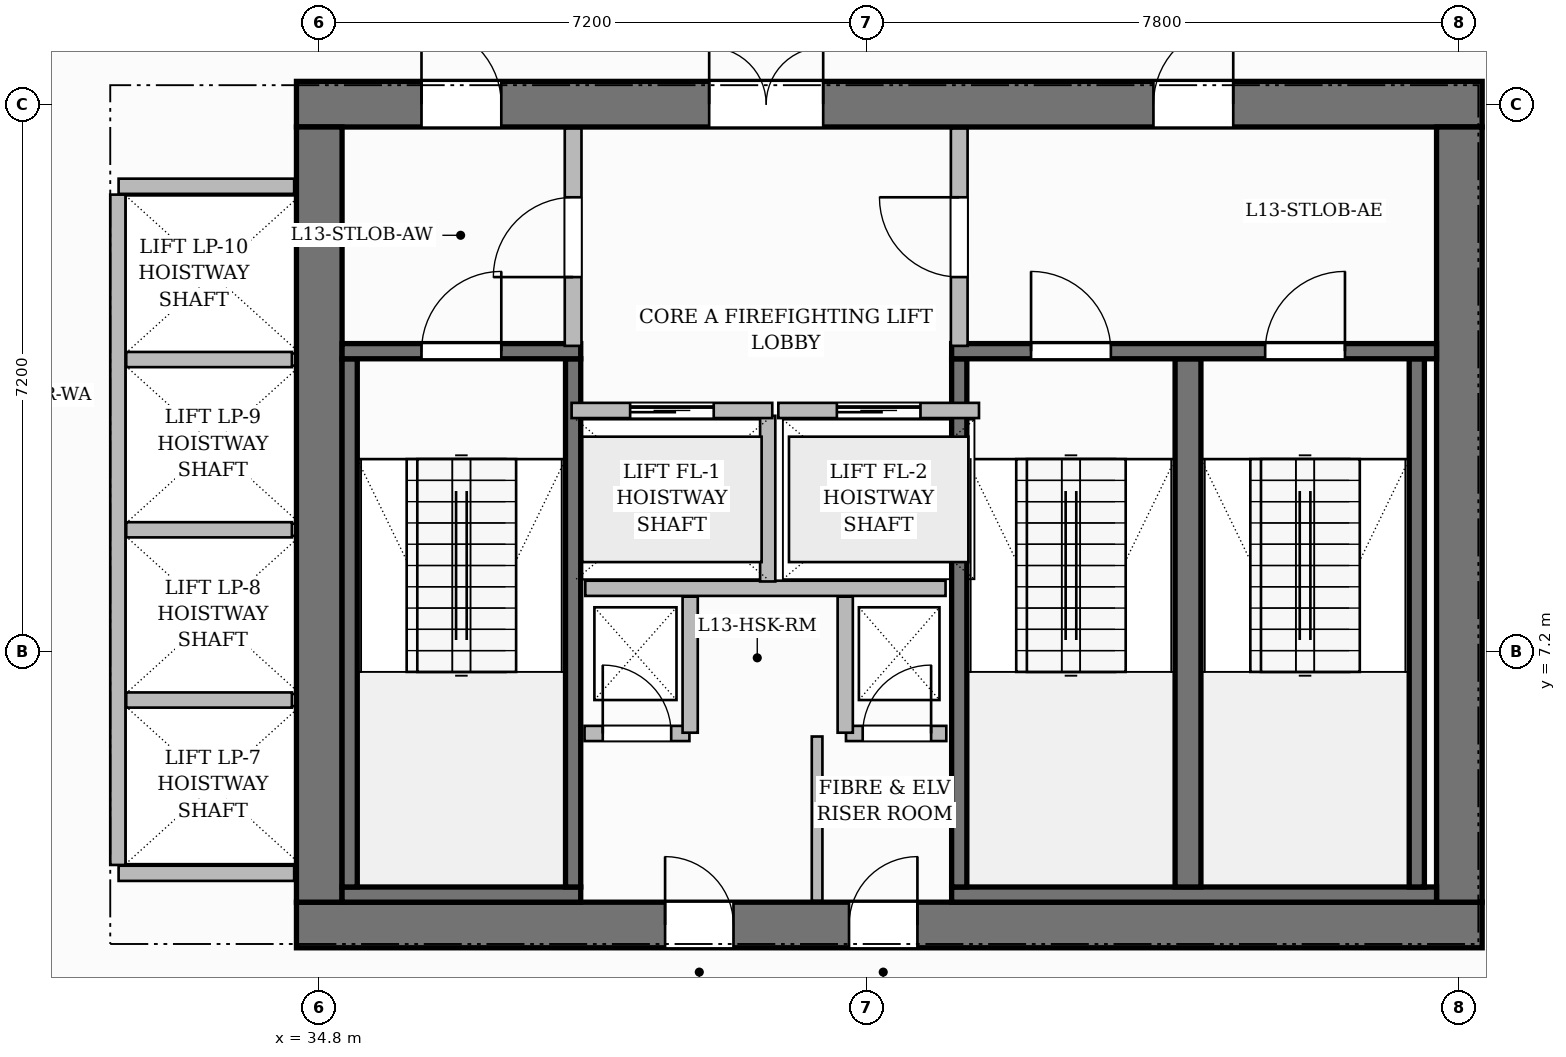
"""IFC4 building model, lengths in metres.
Left out: names, types, materials, properties, quantities, classifications, styles, units other than length and angle.
Written with IfcOpenShell. Run it as: python <this file> out.ifc"""

import sys

from ifc_helpers import new_model, si_unit, direction, frame, frame_2d, origin, place, context, subcontext, project, spatial, rectangle, extrude, source, transform, mapped, element, fill, save


model = new_model("IFC4")
c1 = context("Model", 3, precision=1e-05, world=origin(), true_north=direction((0.0, 1.0)))
c2 = subcontext(c1, "Body", "Model", "MODEL_VIEW")
j1 = project(units=[si_unit("LENGTHUNIT", "METRE"), si_unit("PLANEANGLEUNIT", "RADIAN")], contexts=[c1])
p1 = place(None, origin())
s1 = spatial("IfcSite", under=j1, at=p1, CompositionType="ELEMENT")
p2 = place(p1, origin())
s2 = spatial("IfcBuilding", under=s1, at=p2, CompositionType="ELEMENT")
p3 = place(p2, frame((0.0, 0.0, 58.3)))
s3 = spatial("IfcBuildingStorey", under=s2, at=p3, CompositionType="ELEMENT", Elevation=58.3)
p4 = place(p3, frame((34.5, 3.6, 0.0), z_axis=(0.0, 0.0, 1.0), x_axis=(1.0, 0.0, 0.0)))
e1 = element("IfcWall", 1, at=p4, inside=s3, PredefinedType="SHEAR", context=c2, shape_type="SweptSolid", body=[
    extrude(rectangle(XDim=15.6, YDim=0.6, at=frame_2d((7.8, 0.0))), origin(), (0.0, 0.0, 1.0), 3.7),
])
p5 = place(p4, frame((4.85, 0.0, 0.0)))
e2 = element("IfcOpeningElement", 2, at=p5, cuts=e1, PredefinedType="OPENING", context=c2, shape_type="SweptSolid", body=[
    extrude(rectangle(XDim=0.9, YDim=2.1, at=frame_2d((0.45, 1.05))), frame((0.0, 0.31, 0.0), z_axis=(0.0, -1.0, 0.0), x_axis=(1.0, 0.0, 0.0)), (0.0, 0.0, 1.0), 0.62),
])
p6 = place(p4, frame((7.27, 0.0, 0.0)))
e3 = element("IfcOpeningElement", 3, at=p6, cuts=e1, PredefinedType="OPENING", context=c2, shape_type="SweptSolid", body=[
    extrude(rectangle(XDim=0.9, YDim=2.1, at=frame_2d((0.45, 1.05))), frame((0.0, 0.31, 0.0), z_axis=(0.0, -1.0, 0.0), x_axis=(1.0, 0.0, 0.0)), (0.0, 0.0, 1.0), 0.62),
])
p7 = place(p3, frame((34.5, 14.4, 0.0), z_axis=(0.0, 0.0, 1.0), x_axis=(1.0, 0.0, 0.0)))
e4 = element("IfcWall", 4, at=p7, inside=s3, PredefinedType="SHEAR", context=c2, shape_type="SweptSolid", body=[
    extrude(rectangle(XDim=15.6, YDim=0.6, at=frame_2d((7.8, 0.0))), origin(), (0.0, 0.0, 1.0), 3.7),
])
p8 = place(p7, frame((5.43, 0.0, 0.0)))
e5 = element("IfcOpeningElement", 5, at=p8, cuts=e4, PredefinedType="OPENING", context=c2, shape_type="SweptSolid", body=[
    extrude(rectangle(XDim=1.5, YDim=2.2, at=frame_2d((0.75, 1.1))), frame((0.0, 0.31, 0.0), z_axis=(0.0, -1.0, 0.0), x_axis=(1.0, 0.0, 0.0)), (0.0, 0.0, 1.0), 0.62),
])
p9 = place(p7, frame((1.645, 0.0, 0.0)))
e6 = element("IfcOpeningElement", 6, at=p9, cuts=e4, PredefinedType="OPENING", context=c2, shape_type="SweptSolid", body=[
    extrude(rectangle(XDim=1.05, YDim=2.15, at=frame_2d((0.525, 1.075))), frame((0.0, 0.31, 0.0), z_axis=(0.0, -1.0, 0.0), x_axis=(1.0, 0.0, 0.0)), (0.0, 0.0, 1.0), 0.62),
])
p10 = place(p7, frame((11.275, 0.0, 0.0)))
e7 = element("IfcOpeningElement", 7, at=p10, cuts=e4, PredefinedType="OPENING", context=c2, shape_type="SweptSolid", body=[
    extrude(rectangle(XDim=1.05, YDim=2.15, at=frame_2d((0.525, 1.075))), frame((0.0, 0.31, 0.0), z_axis=(0.0, -1.0, 0.0), x_axis=(1.0, 0.0, 0.0)), (0.0, 0.0, 1.0), 0.62),
])
for number, where, z_axis, x_axis in (
    (8, (34.8, 3.9, 0.0), (0.0, 0.0, 1.0), (0.0, 1.0, 0.0)),
    (9, (49.8, 3.9, 0.0), (0.0, 0.0, 1.0), (0.0, 1.0, 0.0)),
):
    element("IfcWall", number, at=place(p3, frame(where, z_axis=z_axis, x_axis=x_axis)), inside=s3, PredefinedType="SHEAR", context=c2, shape_type="SweptSolid", body=[
        extrude(rectangle(XDim=10.2, YDim=0.6, at=frame_2d((5.1, 0.0))), origin(), (0.0, 0.0, 1.0), 3.7),
    ])
p11 = place(p3, frame((35.1, 4.0, 0.0), z_axis=(0.0, 0.0, 1.0), x_axis=(1.0, 0.0, 0.0)))
e10 = element("IfcWall", 10, at=p11, inside=s3, PredefinedType="SHEAR", context=c2, shape_type="SweptSolid", body=[
    extrude(rectangle(XDim=3.14, YDim=0.2, at=frame_2d((1.57, 0.0))), origin(), (0.0, 0.0, 1.0), 3.7),
])
for number, where, z_axis, x_axis in (
    (11, (35.2, 4.1, 0.0), (0.0, 0.0, 1.0), (0.0, 1.0, 0.0)),
    (12, (38.14, 4.1, 0.0), (0.0, 0.0, 1.0), (0.0, 1.0, 0.0)),
):
    element("IfcWall", number, at=place(p3, frame(where, z_axis=z_axis, x_axis=x_axis)), inside=s3, PredefinedType="SHEAR", context=c2, shape_type="SweptSolid", body=[
        extrude(rectangle(XDim=6.95, YDim=0.2, at=frame_2d((3.475, 0.0))), origin(), (0.0, 0.0, 1.0), 3.7),
    ])
p12 = place(p3, frame((35.1, 11.15, 0.0), z_axis=(0.0, 0.0, 1.0), x_axis=(1.0, 0.0, 0.0)))
e13 = element("IfcWall", 13, at=p12, inside=s3, PredefinedType="SHEAR", context=c2, shape_type="SweptSolid", body=[
    extrude(rectangle(XDim=3.14, YDim=0.2, at=frame_2d((1.57, 0.0))), origin(), (0.0, 0.0, 1.0), 3.7),
])
p13 = place(p12, frame((1.045, 0.0, 0.0)))
e14 = element("IfcOpeningElement", 14, at=p13, cuts=e13, PredefinedType="OPENING", context=c2, shape_type="SweptSolid", body=[
    extrude(rectangle(XDim=1.05, YDim=2.2, at=frame_2d((0.525, 1.1))), frame((0.0, 0.11, 0.0), z_axis=(0.0, -1.0, 0.0), x_axis=(1.0, 0.0, 0.0)), (0.0, 0.0, 1.0), 0.22),
])
p14 = place(p3, frame((43.12, 4.0, 0.0), z_axis=(0.0, 0.0, 1.0), x_axis=(1.0, 0.0, 0.0)))
e15 = element("IfcWall", 15, at=p14, inside=s3, PredefinedType="SHEAR", context=c2, shape_type="SweptSolid", body=[
    extrude(rectangle(XDim=6.38, YDim=0.2, at=frame_2d((3.19, 0.0))), origin(), (0.0, 0.0, 1.0), 3.7),
])
p15 = place(p3, frame((43.22, 4.1, 0.0), z_axis=(0.0, 0.0, 1.0), x_axis=(0.0, 1.0, 0.0)))
e16 = element("IfcWall", 16, at=p15, inside=s3, PredefinedType="SHEAR", context=c2, shape_type="SweptSolid", body=[
    extrude(rectangle(XDim=6.95, YDim=0.2, at=frame_2d((3.475, 0.0))), origin(), (0.0, 0.0, 1.0), 3.7),
])
p16 = place(p3, frame((46.23, 4.1, 0.0), z_axis=(0.0, 0.0, 1.0), x_axis=(0.0, 1.0, 0.0)))
e17 = element("IfcWall", 17, at=p16, inside=s3, PredefinedType="SHEAR", context=c2, shape_type="SweptSolid", body=[
    extrude(rectangle(XDim=6.95, YDim=0.34, at=frame_2d((3.475, 0.0))), origin(), (0.0, 0.0, 1.0), 3.7),
])
p17 = place(p3, frame((49.24, 4.1, 0.0), z_axis=(0.0, 0.0, 1.0), x_axis=(0.0, 1.0, 0.0)))
e18 = element("IfcWall", 18, at=p17, inside=s3, PredefinedType="SHEAR", context=c2, shape_type="SweptSolid", body=[
    extrude(rectangle(XDim=6.95, YDim=0.2, at=frame_2d((3.475, 0.0))), origin(), (0.0, 0.0, 1.0), 3.7),
])
p18 = place(p3, frame((43.12, 11.15, 0.0), z_axis=(0.0, 0.0, 1.0), x_axis=(1.0, 0.0, 0.0)))
e19 = element("IfcWall", 19, at=p18, inside=s3, PredefinedType="SHEAR", context=c2, shape_type="SweptSolid", body=[
    extrude(rectangle(XDim=6.38, YDim=0.2, at=frame_2d((3.19, 0.0))), origin(), (0.0, 0.0, 1.0), 3.7),
])
p19 = place(p18, frame((1.045, 0.0, 0.0)))
e20 = element("IfcOpeningElement", 20, at=p19, cuts=e19, PredefinedType="OPENING", context=c2, shape_type="SweptSolid", body=[
    extrude(rectangle(XDim=1.05, YDim=2.2, at=frame_2d((0.525, 1.1))), frame((0.0, 0.11, 0.0), z_axis=(0.0, -1.0, 0.0), x_axis=(1.0, 0.0, 0.0)), (0.0, 0.0, 1.0), 0.22),
])
p20 = place(p18, frame((4.125, 0.0, 0.0)))
e21 = element("IfcOpeningElement", 21, at=p20, cuts=e19, PredefinedType="OPENING", context=c2, shape_type="SweptSolid", body=[
    extrude(rectangle(XDim=1.05, YDim=2.2, at=frame_2d((0.525, 1.1))), frame((0.0, 0.11, 0.0), z_axis=(0.0, -1.0, 0.0), x_axis=(1.0, 0.0, 0.0)), (0.0, 0.0, 1.0), 0.22),
])
p21 = place(p3, frame((38.3, 8.03, 0.0), z_axis=(0.0, 0.0, 1.0), x_axis=(1.0, 0.0, 0.0)))
e22 = element("IfcWall", 22, at=p21, inside=s3, PredefinedType="PARTITIONING", context=c2, shape_type="SweptSolid", body=[
    extrude(rectangle(XDim=4.74, YDim=0.2, at=frame_2d((2.37, 0.0))), origin(), (0.0, 0.0, 1.0), 3.45),
])
p22 = place(p3, frame((40.7, 8.12, 0.0), z_axis=(0.0, 0.0, 1.0), x_axis=(0.0, 1.0, 0.0)))
e23 = element("IfcWall", 23, at=p22, inside=s3, PredefinedType="PARTITIONING", context=c2, shape_type="SweptSolid", body=[
    extrude(rectangle(XDim=2.18, YDim=0.2, at=frame_2d((1.09, 0.0))), origin(), (0.0, 0.0, 1.0), 3.45),
])
p23 = place(p3, frame((38.14, 11.22, 0.0), z_axis=(0.0, 0.0, 1.0), x_axis=(0.0, 1.0, 0.0)))
e24 = element("IfcWall", 24, at=p23, inside=s3, PredefinedType="PARTITIONING", context=c2, shape_type="SweptSolid", body=[
    extrude(rectangle(XDim=2.86, YDim=0.22, at=frame_2d((1.43, 0.0))), origin(), (0.0, 0.0, 1.0), 3.45),
])
p24 = place(p23, frame((0.905, 0.0, 0.0)))
e25 = element("IfcOpeningElement", 25, at=p24, cuts=e24, PredefinedType="OPENING", context=c2, shape_type="SweptSolid", body=[
    extrude(rectangle(XDim=1.05, YDim=2.15, at=frame_2d((0.525, 1.075))), frame((0.0, 0.12, 0.0), z_axis=(0.0, -1.0, 0.0), x_axis=(1.0, 0.0, 0.0)), (0.0, 0.0, 1.0), 0.24),
])
p25 = place(p3, frame((43.22, 11.22, 0.0), z_axis=(0.0, 0.0, 1.0), x_axis=(0.0, 1.0, 0.0)))
e26 = element("IfcWall", 26, at=p25, inside=s3, PredefinedType="PARTITIONING", context=c2, shape_type="SweptSolid", body=[
    extrude(rectangle(XDim=2.86, YDim=0.22, at=frame_2d((1.43, 0.0))), origin(), (0.0, 0.0, 1.0), 3.45),
])
p26 = place(p25, frame((0.905, 0.0, 0.0)))
e27 = element("IfcOpeningElement", 27, at=p26, cuts=e26, PredefinedType="OPENING", context=c2, shape_type="SweptSolid", body=[
    extrude(rectangle(XDim=1.05, YDim=2.15, at=frame_2d((0.525, 1.075))), frame((0.0, 0.12, 0.0), z_axis=(0.0, -1.0, 0.0), x_axis=(1.0, 0.0, 0.0)), (0.0, 0.0, 1.0), 0.24),
])
p27 = place(p3, frame((38.29, 6.12, 0.0), z_axis=(0.0, 0.0, 1.0), x_axis=(1.0, 0.0, 0.0)))
e28 = element("IfcWall", 28, at=p27, inside=s3, PredefinedType="PARTITIONING", context=c2, shape_type="SweptSolid", body=[
    extrude(rectangle(XDim=1.38, YDim=0.2, at=frame_2d((0.69, 0.0))), origin(), (0.0, 0.0, 1.0), 3.45),
])
p28 = place(p27, frame((0.24, 0.0, 0.0)))
e29 = element("IfcOpeningElement", 29, at=p28, cuts=e28, PredefinedType="OPENING", context=c2, shape_type="SweptSolid", body=[
    extrude(rectangle(XDim=0.9, YDim=2.1, at=frame_2d((0.45, 1.05))), frame((0.0, 0.11, 0.0), z_axis=(0.0, -1.0, 0.0), x_axis=(1.0, 0.0, 0.0)), (0.0, 0.0, 1.0), 0.22),
])
p29 = place(p3, frame((39.68, 6.13, 0.0), z_axis=(0.0, 0.0, 1.0), x_axis=(0.0, 1.0, 0.0)))
e30 = element("IfcWall", 30, at=p29, inside=s3, PredefinedType="PARTITIONING", context=c2, shape_type="SweptSolid", body=[
    extrude(rectangle(XDim=1.79, YDim=0.2, at=frame_2d((0.895, 0.0))), origin(), (0.0, 0.0, 1.0), 3.45),
])
p30 = place(p3, frame((41.73, 6.12, 0.0), z_axis=(0.0, 0.0, 1.0), x_axis=(1.0, 0.0, 0.0)))
e31 = element("IfcWall", 31, at=p30, inside=s3, PredefinedType="PARTITIONING", context=c2, shape_type="SweptSolid", body=[
    extrude(rectangle(XDim=1.32, YDim=0.2, at=frame_2d((0.66, 0.0))), origin(), (0.0, 0.0, 1.0), 3.45),
])
p31 = place(p30, frame((0.22, 0.0, 0.0)))
e32 = element("IfcOpeningElement", 32, at=p31, cuts=e31, PredefinedType="OPENING", context=c2, shape_type="SweptSolid", body=[
    extrude(rectangle(XDim=0.9, YDim=2.1, at=frame_2d((0.45, 1.05))), frame((0.0, 0.11, 0.0), z_axis=(0.0, -1.0, 0.0), x_axis=(1.0, 0.0, 0.0)), (0.0, 0.0, 1.0), 0.22),
])
p32 = place(p3, frame((41.72, 6.13, 0.0), z_axis=(0.0, 0.0, 1.0), x_axis=(0.0, 1.0, 0.0)))
e33 = element("IfcWall", 33, at=p32, inside=s3, PredefinedType="PARTITIONING", context=c2, shape_type="SweptSolid", body=[
    extrude(rectangle(XDim=1.79, YDim=0.2, at=frame_2d((0.895, 0.0))), origin(), (0.0, 0.0, 1.0), 3.45),
])
p33 = place(p3, frame((41.35, 3.92, 0.0), z_axis=(0.0, 0.0, 1.0), x_axis=(0.0, 1.0, 0.0)))
e34 = element("IfcWall", 34, at=p33, inside=s3, PredefinedType="PARTITIONING", context=c2, shape_type="SweptSolid", body=[
    extrude(rectangle(XDim=2.16, YDim=0.14, at=frame_2d((1.08, 0.0))), origin(), (0.0, 0.0, 1.0), 3.45),
])
for number, where, z_axis, x_axis in (
    (35, (32.16, 4.28, 0.0), (0.0, 0.0, 1.0), (1.0, 0.0, 0.0)),
    (36, (32.16, 13.32, 0.0), (0.0, 0.0, 1.0), (1.0, 0.0, 0.0)),
):
    element("IfcWall", number, at=place(p3, frame(where, z_axis=z_axis, x_axis=x_axis)), inside=s3, PredefinedType="PARTITIONING", context=c2, shape_type="SweptSolid", body=[
        extrude(rectangle(XDim=2.31, YDim=0.2, at=frame_2d((1.155, 0.0))), origin(), (0.0, 0.0, 1.0), 3.45),
    ])
p34 = place(p3, frame((32.15, 4.39, 0.0), z_axis=(0.0, 0.0, 1.0), x_axis=(0.0, 1.0, 0.0)))
e37 = element("IfcWall", 37, at=p34, inside=s3, PredefinedType="PARTITIONING", context=c2, shape_type="SweptSolid", body=[
    extrude(rectangle(XDim=8.82, YDim=0.2, at=frame_2d((4.41, 0.0))), origin(), (0.0, 0.0, 1.0), 3.45),
])
for number, where, z_axis, x_axis in (
    (38, (32.26, 6.56, 0.0), (0.0, 0.0, 1.0), (1.0, 0.0, 0.0)),
    (39, (32.26, 8.8, 0.0), (0.0, 0.0, 1.0), (1.0, 0.0, 0.0)),
    (40, (32.26, 11.04, 0.0), (0.0, 0.0, 1.0), (1.0, 0.0, 0.0)),
):
    element("IfcWall", number, at=place(p3, frame(where, z_axis=z_axis, x_axis=x_axis)), inside=s3, PredefinedType="PARTITIONING", context=c2, shape_type="SweptSolid", body=[
        extrude(rectangle(XDim=2.18, YDim=0.2, at=frame_2d((1.09, 0.0))), origin(), (0.0, 0.0, 1.0), 3.45),
    ])
p35 = place(p3, frame((38.12, 10.37, 0.0), z_axis=(0.0, 0.0, 1.0), x_axis=(1.0, 0.0, 0.0)))
e41 = element("IfcWall", 41, at=p35, inside=s3, PredefinedType="PARTITIONING", context=c2, shape_type="SweptSolid", body=[
    extrude(rectangle(XDim=2.64, YDim=0.2, at=frame_2d((1.32, 0.0))), origin(), (0.0, 0.0, 1.0), 3.45),
])
p36 = place(p35, frame((0.77, 0.0, 0.0)))
e42 = element("IfcOpeningElement", 42, at=p36, cuts=e41, PredefinedType="OPENING", context=c2, shape_type="SweptSolid", body=[
    extrude(rectangle(XDim=1.1, YDim=2.2, at=frame_2d((0.55, 1.1))), frame((0.0, 0.11, 0.0), z_axis=(0.0, -1.0, 0.0), x_axis=(1.0, 0.0, 0.0)), (0.0, 0.0, 1.0), 0.22),
])
p37 = place(p3, frame((40.84, 10.37, 0.0), z_axis=(0.0, 0.0, 1.0), x_axis=(1.0, 0.0, 0.0)))
e43 = element("IfcWall", 43, at=p37, inside=s3, PredefinedType="PARTITIONING", context=c2, shape_type="SweptSolid", body=[
    extrude(rectangle(XDim=2.64, YDim=0.2, at=frame_2d((1.32, 0.0))), origin(), (0.0, 0.0, 1.0), 3.45),
])
p38 = place(p37, frame((0.77, 0.0, 0.0)))
e44 = element("IfcOpeningElement", 44, at=p38, cuts=e43, PredefinedType="OPENING", context=c2, shape_type="SweptSolid", body=[
    extrude(rectangle(XDim=1.1, YDim=2.2, at=frame_2d((0.55, 1.1))), frame((0.0, 0.11, 0.0), z_axis=(0.0, -1.0, 0.0), x_axis=(1.0, 0.0, 0.0)), (0.0, 0.0, 1.0), 0.22),
])
m1 = source(origin(), c2, "Body", "SweptSolid", [
    extrude(rectangle(XDim=1.05, YDim=2.2, at=frame_2d((0.525, 1.1))), frame((0.0, 0.025, 0.0), z_axis=(0.0, -1.0, 0.0), x_axis=(1.0, 0.0, 0.0)), (0.0, 0.0, 1.0), 0.05),
])
p39 = place(p13, origin())
e45 = element("IfcDoor", 45, at=p39, inside=s3, OperationType="SINGLE_SWING_RIGHT", PredefinedType="DOOR", context=c2, shape_type="MappedRepresentation", body=[
    mapped(m1, transform((0.0, 0.0, 0.0), scale=1.0)),
])
fill(e14, e45)
p40 = place(p19, origin())
e46 = element("IfcDoor", 46, at=p40, inside=s3, OperationType="SINGLE_SWING_LEFT", PredefinedType="DOOR", context=c2, shape_type="MappedRepresentation", body=[
    mapped(m1, transform((0.0, 0.0, 0.0), scale=1.0)),
])
fill(e20, e46)
p41 = place(p20, origin())
e47 = element("IfcDoor", 47, at=p41, inside=s3, OperationType="SINGLE_SWING_RIGHT", PredefinedType="DOOR", context=c2, shape_type="MappedRepresentation", body=[
    mapped(m1, transform((0.0, 0.0, 0.0), scale=1.0)),
])
fill(e21, e47)
m2 = source(origin(), c2, "Body", "SweptSolid", [
    extrude(rectangle(XDim=1.05, YDim=2.15, at=frame_2d((0.525, 1.075))), frame((0.0, 0.025, 0.0), z_axis=(0.0, -1.0, 0.0), x_axis=(1.0, 0.0, 0.0)), (0.0, 0.0, 1.0), 0.05),
])
p42 = place(p24, origin())
e48 = element("IfcDoor", 48, at=p42, inside=s3, OperationType="SINGLE_SWING_LEFT", PredefinedType="DOOR", context=c2, shape_type="MappedRepresentation", body=[
    mapped(m2, transform((0.0, 0.0, 0.0), scale=1.0)),
])
fill(e25, e48)
p43 = place(p26, origin())
e49 = element("IfcDoor", 49, at=p43, inside=s3, OperationType="SINGLE_SWING_RIGHT", PredefinedType="DOOR", context=c2, shape_type="MappedRepresentation", body=[
    mapped(m2, transform((0.0, 0.0, 0.0), scale=1.0)),
])
fill(e27, e49)
m3 = source(origin(), c2, "Body", "SweptSolid", [
    extrude(rectangle(XDim=1.5, YDim=2.2, at=frame_2d((0.75, 1.1))), frame((0.0, 0.025, 0.0), z_axis=(0.0, -1.0, 0.0), x_axis=(1.0, 0.0, 0.0)), (0.0, 0.0, 1.0), 0.05),
])
p44 = place(p8, origin())
e50 = element("IfcDoor", 50, at=p44, inside=s3, OperationType="DOUBLE_DOOR_SINGLE_SWING", PredefinedType="DOOR", context=c2, shape_type="MappedRepresentation", body=[
    mapped(m3, transform((0.0, 0.0, 0.0), scale=1.0)),
])
fill(e5, e50)
p45 = place(p9, origin())
e51 = element("IfcDoor", 51, at=p45, inside=s3, OperationType="SINGLE_SWING_LEFT", PredefinedType="DOOR", context=c2, shape_type="MappedRepresentation", body=[
    mapped(m2, transform((0.0, 0.0, 0.0), scale=1.0)),
])
fill(e6, e51)
p46 = place(p10, origin())
e52 = element("IfcDoor", 52, at=p46, inside=s3, OperationType="SINGLE_SWING_RIGHT", PredefinedType="DOOR", context=c2, shape_type="MappedRepresentation", body=[
    mapped(m2, transform((0.0, 0.0, 0.0), scale=1.0)),
])
fill(e7, e52)
m4 = source(origin(), c2, "Body", "SweptSolid", [
    extrude(rectangle(XDim=0.9, YDim=2.1, at=frame_2d((0.45, 1.05))), frame((0.0, 0.025, 0.0), z_axis=(0.0, -1.0, 0.0), x_axis=(1.0, 0.0, 0.0)), (0.0, 0.0, 1.0), 0.05),
])
p47 = place(p28, origin())
e53 = element("IfcDoor", 53, at=p47, inside=s3, OperationType="SINGLE_SWING_LEFT", PredefinedType="DOOR", context=c2, shape_type="MappedRepresentation", body=[
    mapped(m4, transform((0.0, 0.0, 0.0), scale=1.0)),
])
fill(e29, e53)
p48 = place(p31, origin())
e54 = element("IfcDoor", 54, at=p48, inside=s3, OperationType="SINGLE_SWING_RIGHT", PredefinedType="DOOR", context=c2, shape_type="MappedRepresentation", body=[
    mapped(m4, transform((0.0, 0.0, 0.0), scale=1.0)),
])
fill(e32, e54)
p49 = place(p5, origin())
e55 = element("IfcDoor", 55, at=p49, inside=s3, OperationType="SINGLE_SWING_LEFT", PredefinedType="DOOR", context=c2, shape_type="MappedRepresentation", body=[
    mapped(m4, transform((0.0, 0.0, 0.0), scale=1.0)),
])
fill(e2, e55)
p50 = place(p6, origin())
e56 = element("IfcDoor", 56, at=p50, inside=s3, OperationType="SINGLE_SWING_RIGHT", PredefinedType="DOOR", context=c2, shape_type="MappedRepresentation", body=[
    mapped(m4, transform((0.0, 0.0, 0.0), scale=1.0)),
])
fill(e3, e56)
m5 = source(origin(), c2, "Body", "SweptSolid", [
    extrude(rectangle(XDim=1.1, YDim=2.2, at=frame_2d((0.55, 1.1))), frame((0.0, 0.025, 0.0), z_axis=(0.0, -1.0, 0.0), x_axis=(1.0, 0.0, 0.0)), (0.0, 0.0, 1.0), 0.05),
])
p51 = place(p36, origin())
e57 = element("IfcDoor", 57, at=p51, inside=s3, OperationType="SLIDING_TO_LEFT", PredefinedType="DOOR", context=c2, shape_type="MappedRepresentation", body=[
    mapped(m5, transform((0.0, 0.0, 0.0), scale=1.0)),
])
fill(e42, e57)
p52 = place(p38, origin())
e58 = element("IfcDoor", 58, at=p52, inside=s3, OperationType="SLIDING_TO_LEFT", PredefinedType="DOOR", context=c2, shape_type="MappedRepresentation", body=[
    mapped(m5, transform((0.0, 0.0, 0.0), scale=1.0)),
])
fill(e44, e58)
save(model, sys.argv[1])
